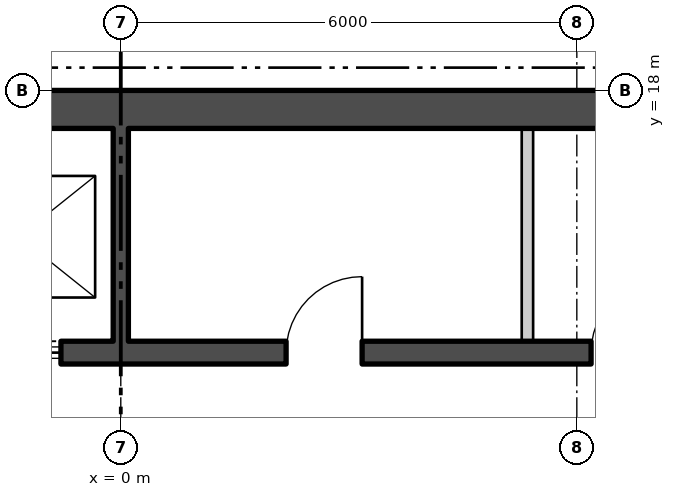
"""IFC4 building model, lengths in metres.
Left out: names, types, materials, properties, quantities, classifications, styles, units other than length and angle.
Written with IfcOpenShell. Run it as: python <this file> out.ifc"""

import sys

from ifc_helpers import new_model, si_unit, direction, frame, frame_2d, origin, place, context, subcontext, project, spatial, rectangle, extrude, element, fill, save


model = new_model("IFC4")
c1 = context("Model", 3, precision=1e-05, world=origin(), true_north=direction((0.0, 1.0)))
c2 = subcontext(c1, "Body", "Model", "MODEL_VIEW")
j1 = project(units=[si_unit("LENGTHUNIT", "METRE"), si_unit("PLANEANGLEUNIT", "RADIAN")], contexts=[c1])
p1 = place(None, origin())
s1 = spatial("IfcSite", under=j1, at=p1, CompositionType="ELEMENT")
p2 = place(p1, origin())
s2 = spatial("IfcBuilding", under=s1, at=p2, CompositionType="ELEMENT")
p3 = place(p2, frame((0.0, 0.0, 163.2)))
s3 = spatial("IfcBuildingStorey", under=s2, at=p3, CompositionType="ELEMENT", Elevation=163.2)
p4 = place(p3, frame((-16.2, 17.75, 0.0), z_axis=(0.0, 0.0, 1.0), x_axis=(1.0, 0.0, 0.0)))
e1 = element("IfcWall", 1, at=p4, inside=s3, PredefinedType="SHEAR", context=c2, shape_type="SweptSolid", body=[
    extrude(rectangle(XDim=32.4, YDim=0.5, at=frame_2d((16.2, 0.0))), origin(), (0.0, 0.0, 1.0), 3.7),
])
p5 = place(p3, frame((-10.7, 14.55, 0.0), z_axis=(0.0, 0.0, 1.0), x_axis=(1.0, 0.0, 0.0)))
e2 = element("IfcWall", 2, at=p5, inside=s3, PredefinedType="SHEAR", context=c2, shape_type="SweptSolid", body=[
    extrude(rectangle(XDim=21.4, YDim=0.3, at=frame_2d((10.7, 0.0))), origin(), (0.0, 0.0, 1.0), 3.7),
])
p6 = place(p5, frame((0.738, 0.0, 0.0)))
e3 = element("IfcOpeningElement", 3, at=p6, cuts=e2, PredefinedType="OPENING", context=c2, shape_type="SweptSolid", body=[
    extrude(rectangle(XDim=1.1, YDim=2.1, at=frame_2d((0.55, 1.05))), frame((0.0, 0.16, 0.0), z_axis=(0.0, -1.0, 0.0), x_axis=(1.0, 0.0, 0.0)), (0.0, 0.0, 1.0), 0.32),
])
p7 = place(p5, frame((3.462, 0.0, 0.0)))
e4 = element("IfcOpeningElement", 4, at=p7, cuts=e2, PredefinedType="OPENING", context=c2, shape_type="SweptSolid", body=[
    extrude(rectangle(XDim=1.1, YDim=2.1, at=frame_2d((0.55, 1.05))), frame((0.0, 0.16, 0.0), z_axis=(0.0, -1.0, 0.0), x_axis=(1.0, 0.0, 0.0)), (0.0, 0.0, 1.0), 0.32),
])
p8 = place(p5, frame((6.138, 0.0, 0.0)))
e5 = element("IfcOpeningElement", 5, at=p8, cuts=e2, PredefinedType="OPENING", context=c2, shape_type="SweptSolid", body=[
    extrude(rectangle(XDim=1.1, YDim=2.1, at=frame_2d((0.55, 1.05))), frame((0.0, 0.16, 0.0), z_axis=(0.0, -1.0, 0.0), x_axis=(1.0, 0.0, 0.0)), (0.0, 0.0, 1.0), 0.32),
])
p9 = place(p5, frame((8.812, 0.0, 0.0)))
e6 = element("IfcOpeningElement", 6, at=p9, cuts=e2, PredefinedType="OPENING", context=c2, shape_type="SweptSolid", body=[
    extrude(rectangle(XDim=1.1, YDim=2.1, at=frame_2d((0.55, 1.05))), frame((0.0, 0.16, 0.0), z_axis=(0.0, -1.0, 0.0), x_axis=(1.0, 0.0, 0.0)), (0.0, 0.0, 1.0), 0.32),
])
p10 = place(p5, frame((19.562, 0.0, 0.0)))
e7 = element("IfcOpeningElement", 7, at=p10, cuts=e2, PredefinedType="OPENING", context=c2, shape_type="SweptSolid", body=[
    extrude(rectangle(XDim=1.1, YDim=2.1, at=frame_2d((0.55, 1.05))), frame((0.0, 0.16, 0.0), z_axis=(0.0, -1.0, 0.0), x_axis=(1.0, 0.0, 0.0)), (0.0, 0.0, 1.0), 0.32),
])
p11 = place(p5, frame((12.875, 0.0, 0.0)))
e8 = element("IfcOpeningElement", 8, at=p11, cuts=e2, PredefinedType="OPENING", context=c2, shape_type="SweptSolid", body=[
    extrude(rectangle(XDim=1.0, YDim=2.1, at=frame_2d((0.5, 1.05))), frame((0.0, 0.16, 0.0), z_axis=(0.0, -1.0, 0.0), x_axis=(1.0, 0.0, 0.0)), (0.0, 0.0, 1.0), 0.32),
])
p12 = place(p5, frame((16.887, 0.0, 0.0)))
e9 = element("IfcOpeningElement", 9, at=p12, cuts=e2, PredefinedType="OPENING", context=c2, shape_type="SweptSolid", body=[
    extrude(rectangle(XDim=1.0, YDim=2.1, at=frame_2d((0.5, 1.05))), frame((0.0, 0.16, 0.0), z_axis=(0.0, -1.0, 0.0), x_axis=(1.0, 0.0, 0.0)), (0.0, 0.0, 1.0), 0.32),
])
p13 = place(p3, frame((0.0, 14.7, 0.0), z_axis=(0.0, 0.0, 1.0), x_axis=(0.0, 1.0, 0.0)))
e10 = element("IfcWall", 10, at=p13, inside=s3, PredefinedType="SHEAR", context=c2, shape_type="SweptSolid", body=[
    extrude(rectangle(XDim=2.8, YDim=0.2, at=frame_2d((1.4, 0.0))), origin(), (0.0, 0.0, 1.0), 3.7),
])
p14 = place(p3, frame((5.35, 14.7, 0.0), z_axis=(0.0, 0.0, 1.0), x_axis=(0.0, 1.0, 0.0)))
e11 = element("IfcWall", 11, at=p14, inside=s3, PredefinedType="PARTITIONING", context=c2, shape_type="SweptSolid", body=[
    extrude(rectangle(XDim=2.8, YDim=0.15, at=frame_2d((1.4, 0.0))), origin(), (0.0, 0.0, 1.0), 3.7),
])
p15 = place(p9, origin())
e12 = element("IfcDoor", 12, at=p15, inside=s3, OperationType="SLIDING_TO_LEFT", PredefinedType="DOOR", context=c2, shape_type="SweptSolid", body=[
    extrude(rectangle(XDim=1.1, YDim=2.1, at=frame_2d((0.55, 1.05))), frame((0.0, 0.025, 0.0), z_axis=(0.0, -1.0, 0.0), x_axis=(1.0, 0.0, 0.0)), (0.0, 0.0, 1.0), 0.05),
])
fill(e6, e12)
p16 = place(p11, origin())
e13 = element("IfcDoor", 13, at=p16, inside=s3, OperationType="SINGLE_SWING_LEFT", PredefinedType="DOOR", context=c2, shape_type="SweptSolid", body=[
    extrude(rectangle(XDim=1.0, YDim=2.1, at=frame_2d((0.5, 1.05))), frame((0.0, 0.025, 0.0), z_axis=(0.0, -1.0, 0.0), x_axis=(1.0, 0.0, 0.0)), (0.0, 0.0, 1.0), 0.05),
])
fill(e8, e13)
p17 = place(p12, origin())
e14 = element("IfcDoor", 14, at=p17, inside=s3, OperationType="SINGLE_SWING_LEFT", PredefinedType="DOOR", context=c2, shape_type="SweptSolid", body=[
    extrude(rectangle(XDim=1.0, YDim=2.1, at=frame_2d((0.5, 1.05))), frame((0.0, 0.025, 0.0), z_axis=(0.0, -1.0, 0.0), x_axis=(1.0, 0.0, 0.0)), (0.0, 0.0, 1.0), 0.05),
])
fill(e9, e14)
save(model, sys.argv[1])
